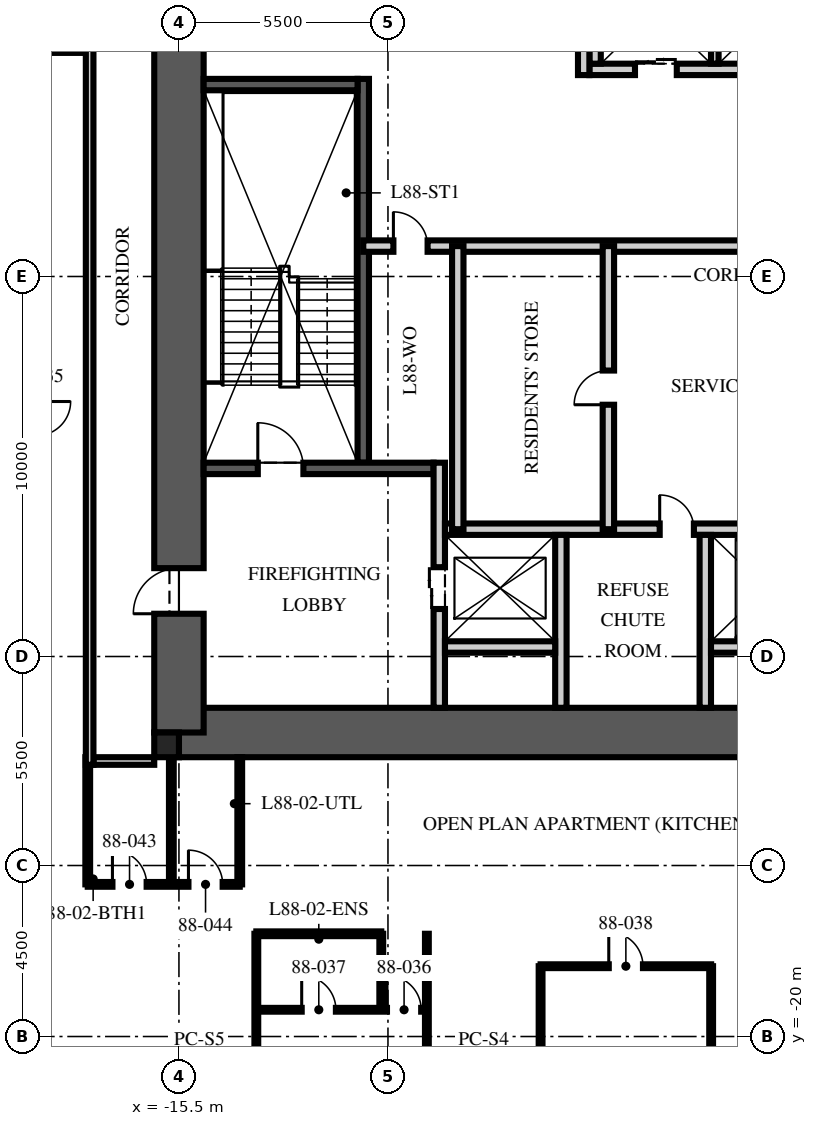
"""IFC4 building model, lengths in metres.
Left out: names, types, materials, properties, quantities, classifications, styles, units other than length and angle.
Written with IfcOpenShell. Run it as: python <this file> out.ifc"""

import sys

from ifc_helpers import new_model, si_unit, direction, frame, frame_2d, origin, origin_2d, place, context, subcontext, project, spatial, rectangle, extrude, element, fill, save


model = new_model("IFC4")
c1 = context("Model", 3, precision=1e-05, world=origin(), true_north=direction((0.0, 1.0)))
c2 = subcontext(c1, "Body", "Model", "MODEL_VIEW")
j1 = project(units=[si_unit("LENGTHUNIT", "METRE"), si_unit("PLANEANGLEUNIT", "RADIAN")], contexts=[c1])
p1 = place(None, origin())
s1 = spatial("IfcSite", under=j1, at=p1, CompositionType="ELEMENT")
p2 = place(p1, origin())
s2 = spatial("IfcBuilding", under=s1, at=p2, CompositionType="ELEMENT")
p3 = place(p2, frame((0.0, 0.0, 349.5)))
s3 = spatial("IfcBuildingStorey", under=s2, at=p3, CompositionType="ELEMENT", Elevation=349.5)
p4 = place(p3, frame((-15.5, -12.0, -0.25), z_axis=(0.0, 0.0, 1.0), x_axis=(1.0, 0.0, 0.0)))
e1 = element("IfcWall", 1, at=p4, inside=s3, PredefinedType="SHEAR", context=c2, shape_type="SweptSolid", body=[
    extrude(rectangle(XDim=31.0, YDim=1.3, at=frame_2d((15.5, 0.0))), origin(), (0.0, 0.0, 1.0), 3.7),
])
p5 = place(p3, frame((-15.5, -12.0, -0.25), z_axis=(0.0, 0.0, 1.0), x_axis=(0.0, 1.0, 0.0)))
e2 = element("IfcWall", 2, at=p5, inside=s3, PredefinedType="SHEAR", context=c2, shape_type="SweptSolid", body=[
    extrude(rectangle(XDim=24.0, YDim=1.3, at=frame_2d((12.0, 0.0))), origin(), (0.0, 0.0, 1.0), 3.7),
])
p6 = place(p5, frame((3.125, 0.0, 0.25)))
e3 = element("IfcOpeningElement", 3, at=p6, cuts=e2, PredefinedType="OPENING", context=c2, shape_type="SweptSolid", body=[
    extrude(rectangle(XDim=1.2, YDim=2.1, at=frame_2d((0.6, 1.05))), frame((0.0, 0.66, 0.0), z_axis=(0.0, -1.0, 0.0), x_axis=(1.0, 0.0, 0.0)), (0.0, 0.0, 1.0), 1.32),
])
p7 = place(p5, frame((19.375, 0.0, 0.25)))
e4 = element("IfcOpeningElement", 4, at=p7, cuts=e2, PredefinedType="OPENING", context=c2, shape_type="SweptSolid", body=[
    extrude(rectangle(XDim=1.8, YDim=2.1, at=frame_2d((0.9, 1.05))), frame((0.0, 0.66, 0.0), z_axis=(0.0, -1.0, 0.0), x_axis=(1.0, 0.0, 0.0)), (0.0, 0.0, 1.0), 1.32),
])
p8 = place(p3, frame((-15.825, -12.325, -0.25), z_axis=(0.0, 0.0, 1.0), x_axis=(1.0, 0.0, 0.0)))
e5 = element("IfcColumn", 5, at=p8, inside=s3, PredefinedType="COLUMN", context=c2, shape_type="SweptSolid", body=[
    extrude(rectangle(XDim=0.65, YDim=0.65, at=origin_2d()), origin(), (0.0, 0.0, 1.0), 3.7),
])
p9 = place(p3, frame((-10.65, -4.9, 0.0), z_axis=(0.0, 0.0, 1.0), x_axis=(0.0, 1.0, 0.0)))
e6 = element("IfcWall", 6, at=p9, inside=s3, PredefinedType="SOLIDWALL", context=c2, shape_type="SweptSolid", body=[
    extrude(rectangle(XDim=10.1, YDim=0.3, at=frame_2d((5.05, 0.0))), origin(), (0.0, 0.0, 1.0), 3.45),
])
p10 = place(p3, frame((-14.85, -5.05, 0.0), z_axis=(0.0, 0.0, 1.0), x_axis=(1.0, 0.0, 0.0)))
e7 = element("IfcWall", 7, at=p10, inside=s3, PredefinedType="SOLIDWALL", context=c2, shape_type="SweptSolid", body=[
    extrude(rectangle(XDim=6.05, YDim=0.3, at=frame_2d((3.025, 0.0))), origin(), (0.0, 0.0, 1.0), 3.45),
])
p11 = place(p10, frame((1.425, 0.0, 0.0)))
e8 = element("IfcOpeningElement", 8, at=p11, cuts=e7, PredefinedType="OPENING", context=c2, shape_type="SweptSolid", body=[
    extrude(rectangle(XDim=1.2, YDim=2.1, at=frame_2d((0.6, 1.05))), frame((0.0, 0.16, 0.0), z_axis=(0.0, -1.0, 0.0), x_axis=(1.0, 0.0, 0.0)), (0.0, 0.0, 1.0), 0.32),
])
p12 = place(p3, frame((-14.85, 5.05, 0.0), z_axis=(0.0, 0.0, 1.0), x_axis=(1.0, 0.0, 0.0)))
e9 = element("IfcWall", 9, at=p12, inside=s3, PredefinedType="SOLIDWALL", context=c2, shape_type="SweptSolid", body=[
    extrude(rectangle(XDim=4.05, YDim=0.3, at=frame_2d((2.025, 0.0))), origin(), (0.0, 0.0, 1.0), 3.45),
])
p13 = place(p3, frame((-8.65, -11.35, 0.0), z_axis=(0.0, 0.0, 1.0), x_axis=(0.0, 1.0, 0.0)))
e10 = element("IfcWall", 10, at=p13, inside=s3, PredefinedType="PARTITIONING", context=c2, shape_type="SweptSolid", body=[
    extrude(rectangle(XDim=6.45, YDim=0.3, at=frame_2d((3.225, 0.0))), origin(), (0.0, 0.0, 1.0), 3.45),
])
p14 = place(p13, frame((2.6, 0.0, 0.0)))
e11 = element("IfcOpeningElement", 11, at=p14, cuts=e10, PredefinedType="OPENING", context=c2, shape_type="SweptSolid", body=[
    extrude(rectangle(XDim=1.1, YDim=2.1, at=frame_2d((0.55, 1.05))), frame((0.0, 0.16, 0.0), z_axis=(0.0, -1.0, 0.0), x_axis=(1.0, 0.0, 0.0)), (0.0, 0.0, 1.0), 0.32),
])
p15 = place(p3, frame((-8.5, -6.65, 0.0), z_axis=(0.0, 0.0, 1.0), x_axis=(1.0, 0.0, 0.0)))
e12 = element("IfcWall", 12, at=p15, inside=s3, PredefinedType="PARTITIONING", context=c2, shape_type="SweptSolid", body=[
    extrude(rectangle(XDim=17.0, YDim=0.3, at=frame_2d((8.5, 0.0))), origin(), (0.0, 0.0, 1.0), 3.45),
])
p16 = place(p15, frame((7.8, 0.0, 0.0)))
e13 = element("IfcOpeningElement", 13, at=p16, cuts=e12, PredefinedType="OPENING", context=c2, shape_type="SweptSolid", body=[
    extrude(rectangle(XDim=1.3, YDim=2.4, at=frame_2d((0.65, 1.2))), frame((0.0, 0.16, 0.0), z_axis=(0.0, -1.0, 0.0), x_axis=(1.0, 0.0, 0.0)), (0.0, 0.0, 1.0), 0.32),
])
p17 = place(p15, frame((5.65, 0.0, 0.0)))
e14 = element("IfcOpeningElement", 14, at=p17, cuts=e12, PredefinedType="OPENING", context=c2, shape_type="SweptSolid", body=[
    extrude(rectangle(XDim=0.9, YDim=2.1, at=frame_2d((0.45, 1.05))), frame((0.0, 0.16, 0.0), z_axis=(0.0, -1.0, 0.0), x_axis=(1.0, 0.0, 0.0)), (0.0, 0.0, 1.0), 0.32),
])
p18 = place(p15, frame((10.4, 0.0, 0.0)))
e15 = element("IfcOpeningElement", 15, at=p18, cuts=e12, PredefinedType="OPENING", context=c2, shape_type="SweptSolid", body=[
    extrude(rectangle(XDim=0.9, YDim=2.1, at=frame_2d((0.45, 1.05))), frame((0.0, 0.16, 0.0), z_axis=(0.0, -1.0, 0.0), x_axis=(1.0, 0.0, 0.0)), (0.0, 0.0, 1.0), 0.32),
])
for number, where, z_axis, x_axis in (
    (16, (-5.45, -11.35, 0.0), (0.0, 0.0, 1.0), (0.0, 1.0, 0.0)),
    (17, (-1.65, -11.35, 0.0), (0.0, 0.0, 1.0), (0.0, 1.0, 0.0)),
):
    element("IfcWall", number, at=place(p3, frame(where, z_axis=z_axis, x_axis=x_axis)), inside=s3, PredefinedType="PARTITIONING", context=c2, shape_type="SweptSolid", body=[
        extrude(rectangle(XDim=4.55, YDim=0.3, at=frame_2d((2.275, 0.0))), origin(), (0.0, 0.0, 1.0), 3.45),
    ])
for number, where, z_axis, x_axis in (
    (18, (-8.5, -9.75, 0.0), (0.0, 0.0, 1.0), (1.0, 0.0, 0.0)),
    (19, (-1.5, -9.75, 0.0), (0.0, 0.0, 1.0), (1.0, 0.0, 0.0)),
):
    element("IfcWall", number, at=place(p3, frame(where, z_axis=z_axis, x_axis=x_axis)), inside=s3, PredefinedType="PARTITIONING", context=c2, shape_type="SweptSolid", body=[
        extrude(rectangle(XDim=2.9, YDim=0.3, at=frame_2d((1.45, 0.0))), origin(), (0.0, 0.0, 1.0), 3.45),
    ])
p19 = place(p3, frame((-4.7, 5.45, 0.0), z_axis=(0.0, 0.0, 1.0), x_axis=(1.0, 0.0, 0.0)))
e20 = element("IfcWall", 20, at=p19, inside=s3, PredefinedType="PARTITIONING", context=c2, shape_type="SweptSolid", body=[
    extrude(rectangle(XDim=9.7, YDim=0.3, at=frame_2d((4.85, 0.0))), origin(), (0.0, 0.0, 1.0), 3.45),
])
p20 = place(p19, frame((1.2, 0.0, 0.0)))
e21 = element("IfcOpeningElement", 21, at=p20, cuts=e20, PredefinedType="OPENING", context=c2, shape_type="SweptSolid", body=[
    extrude(rectangle(XDim=1.1, YDim=2.1, at=frame_2d((0.55, 1.05))), frame((0.0, 0.16, 0.0), z_axis=(0.0, -1.0, 0.0), x_axis=(1.0, 0.0, 0.0)), (0.0, 0.0, 1.0), 0.32),
])
p21 = place(p19, frame((4.3, 0.0, 0.0)))
e22 = element("IfcOpeningElement", 22, at=p21, cuts=e20, PredefinedType="OPENING", context=c2, shape_type="SweptSolid", body=[
    extrude(rectangle(XDim=1.1, YDim=2.1, at=frame_2d((0.55, 1.05))), frame((0.0, 0.16, 0.0), z_axis=(0.0, -1.0, 0.0), x_axis=(1.0, 0.0, 0.0)), (0.0, 0.0, 1.0), 0.32),
])
p22 = place(p19, frame((7.4, 0.0, 0.0)))
e23 = element("IfcOpeningElement", 23, at=p22, cuts=e20, PredefinedType="OPENING", context=c2, shape_type="SweptSolid", body=[
    extrude(rectangle(XDim=1.1, YDim=2.1, at=frame_2d((0.55, 1.05))), frame((0.0, 0.16, 0.0), z_axis=(0.0, -1.0, 0.0), x_axis=(1.0, 0.0, 0.0)), (0.0, 0.0, 1.0), 0.32),
])
p23 = place(p3, frame((-4.55, 5.6, 0.0), z_axis=(0.0, 0.0, 1.0), x_axis=(0.0, 1.0, 0.0)))
e24 = element("IfcWall", 24, at=p23, inside=s3, PredefinedType="PARTITIONING", context=c2, shape_type="SweptSolid", body=[
    extrude(rectangle(XDim=2.8, YDim=0.3, at=frame_2d((1.4, 0.0))), origin(), (0.0, 0.0, 1.0), 3.45),
])
p24 = place(p3, frame((-1.4, 5.6, 0.0), z_axis=(0.0, 0.0, 1.0), x_axis=(0.0, 1.0, 0.0)))
e25 = element("IfcWall", 25, at=p24, inside=s3, PredefinedType="PARTITIONING", context=c2, shape_type="SweptSolid", body=[
    extrude(rectangle(XDim=2.8, YDim=0.2, at=frame_2d((1.4, 0.0))), origin(), (0.0, 0.0, 1.0), 3.45),
])
p25 = place(p3, frame((-10.65, 0.8, 0.0), z_axis=(0.0, 0.0, 1.0), x_axis=(1.0, 0.0, 0.0)))
e26 = element("IfcWall", 26, at=p25, inside=s3, PredefinedType="PARTITIONING", context=c2, shape_type="SweptSolid", body=[
    extrude(rectangle(XDim=21.3, YDim=0.3, at=frame_2d((10.65, 0.0))), origin(), (0.0, 0.0, 1.0), 3.45),
])
p26 = place(p25, frame((10.05, 0.0, 0.0)))
e27 = element("IfcOpeningElement", 27, at=p26, cuts=e26, PredefinedType="OPENING", context=c2, shape_type="SweptSolid", body=[
    extrude(rectangle(XDim=1.2, YDim=2.1, at=frame_2d((0.6, 1.05))), frame((0.0, 0.16, 0.0), z_axis=(0.0, -1.0, 0.0), x_axis=(1.0, 0.0, 0.0)), (0.0, 0.0, 1.0), 0.32),
])
p27 = place(p25, frame((0.793, 0.0, 0.0)))
e28 = element("IfcOpeningElement", 28, at=p27, cuts=e26, PredefinedType="OPENING", context=c2, shape_type="SweptSolid", body=[
    extrude(rectangle(XDim=0.9, YDim=2.1, at=frame_2d((0.45, 1.05))), frame((0.0, 0.16, 0.0), z_axis=(0.0, -1.0, 0.0), x_axis=(1.0, 0.0, 0.0)), (0.0, 0.0, 1.0), 0.32),
])
p28 = place(p3, frame((-4.2, -6.65, 0.0), z_axis=(0.0, 0.0, 1.0), x_axis=(0.0, 1.0, 0.0)))
e29 = element("IfcWall", 29, at=p28, inside=s3, PredefinedType="PARTITIONING", context=c2, shape_type="SweptSolid", body=[
    extrude(rectangle(XDim=7.45, YDim=0.3, at=frame_2d((3.725, 0.0))), origin(), (0.0, 0.0, 1.0), 3.45),
])
p29 = place(p28, frame((3.275, 0.0, 0.0)))
e30 = element("IfcOpeningElement", 30, at=p29, cuts=e29, PredefinedType="OPENING", context=c2, shape_type="SweptSolid", body=[
    extrude(rectangle(XDim=0.9, YDim=2.1, at=frame_2d((0.45, 1.05))), frame((0.0, 0.16, 0.0), z_axis=(0.0, -1.0, 0.0), x_axis=(1.0, 0.0, 0.0)), (0.0, 0.0, 1.0), 0.32),
])
p30 = place(p3, frame((-8.163, -6.65, 0.0), z_axis=(0.0, 0.0, 1.0), x_axis=(0.0, 1.0, 0.0)))
e31 = element("IfcWall", 31, at=p30, inside=s3, PredefinedType="PARTITIONING", context=c2, shape_type="SweptSolid", body=[
    extrude(rectangle(XDim=7.45, YDim=0.3, at=frame_2d((3.725, 0.0))), origin(), (0.0, 0.0, 1.0), 3.45),
])
p31 = place(p3, frame((-4.85, 5.3, 0.0), z_axis=(0.0, 0.0, 1.0), x_axis=(0.0, 1.0, 0.0)))
e32 = element("IfcWall", 32, at=p31, inside=s3, PredefinedType="PARTITIONING", context=c2, shape_type="SweptSolid", body=[
    extrude(rectangle(XDim=6.05, YDim=0.3, at=frame_2d((3.025, 0.0))), origin(), (0.0, 0.0, 1.0), 3.45),
])
p32 = place(p31, frame((4.225, 0.0, 0.0)))
e33 = element("IfcOpeningElement", 33, at=p32, cuts=e32, PredefinedType="OPENING", context=c2, shape_type="SweptSolid", body=[
    extrude(rectangle(XDim=0.9, YDim=2.1, at=frame_2d((0.45, 1.05))), frame((0.0, 0.16, 0.0), z_axis=(0.0, -1.0, 0.0), x_axis=(1.0, 0.0, 0.0)), (0.0, 0.0, 1.0), 0.32),
])
p33 = place(p3, frame((-16.15, -12.75, 0.0), z_axis=(0.0, 0.0, 1.0), x_axis=(-1.0, 0.0, 0.0)))
e34 = element("IfcWall", 34, at=p33, inside=s3, PredefinedType="PARTITIONING", context=c2, shape_type="SweptSolid", body=[
    extrude(rectangle(XDim=1.6, YDim=0.2, at=frame_2d((0.8, 0.0))), origin(), (0.0, 0.0, 1.0), 2.45),
])
p34 = place(p3, frame((-17.95, 5.984, 0.0), z_axis=(0.0, 0.0, 1.0), x_axis=(-1.0, 0.0, 0.0)))
e35 = element("IfcWall", 35, at=p34, inside=s3, PredefinedType="PARTITIONING", context=c2, shape_type="SweptSolid", body=[
    extrude(rectangle(XDim=4.8, YDim=0.2, at=frame_2d((2.4, 0.0))), origin(), (0.0, 0.0, 1.0), 2.85),
])
for number, where, z_axis, x_axis in (
    (36, (-13.464, -17.296, 0.0), (0.0, 0.0, 1.0), (0.0, -1.0, 0.0)),
    (37, (-8.976, -17.296, 0.0), (0.0, 0.0, 1.0), (0.0, -1.0, 0.0)),
):
    element("IfcWall", number, at=place(p3, frame(where, z_axis=z_axis, x_axis=x_axis)), inside=s3, PredefinedType="PARTITIONING", context=c2, shape_type="SweptSolid", body=[
        extrude(rectangle(XDim=5.454, YDim=0.1, at=frame_2d((2.727, 0.0))), origin(), (0.0, 0.0, 1.0), 2.85),
    ])
for number, where, z_axis, x_axis in (
    (38, (-5.984, -18.15, 0.0), (0.0, 0.0, 1.0), (0.0, -1.0, 0.0)),
    (39, (-1.496, -18.15, 0.0), (0.0, 0.0, 1.0), (0.0, -1.0, 0.0)),
):
    element("IfcWall", number, at=place(p3, frame(where, z_axis=z_axis, x_axis=x_axis)), inside=s3, PredefinedType="PARTITIONING", context=c2, shape_type="SweptSolid", body=[
        extrude(rectangle(XDim=4.6, YDim=0.1, at=frame_2d((2.3, 0.0))), origin(), (0.0, 0.0, 1.0), 2.85),
    ])
p35 = place(p3, frame((-13.464, -19.296, 0.0), z_axis=(0.0, 0.0, 1.0), x_axis=(1.0, 0.0, 0.0)))
e40 = element("IfcWall", 40, at=p35, inside=s3, PredefinedType="PARTITIONING", context=c2, shape_type="SweptSolid", body=[
    extrude(rectangle(XDim=4.488, YDim=0.1, at=frame_2d((2.244, 0.0))), origin(), (0.0, 0.0, 1.0), 2.56),
])
p36 = place(p35, frame((3.438, 0.0, 0.0)))
e41 = element("IfcOpeningElement", 41, at=p36, cuts=e40, PredefinedType="OPENING", context=c2, shape_type="SweptSolid", body=[
    extrude(rectangle(XDim=0.9, YDim=2.1, at=frame_2d((0.45, 1.05))), frame((0.0, 0.06, 0.0), z_axis=(0.0, -1.0, 0.0), x_axis=(1.0, 0.0, 0.0)), (0.0, 0.0, 1.0), 0.12),
])
p37 = place(p35, frame((1.194, 0.0, 0.0)))
e42 = element("IfcOpeningElement", 42, at=p37, cuts=e40, PredefinedType="OPENING", context=c2, shape_type="SweptSolid", body=[
    extrude(rectangle(XDim=0.9, YDim=2.1, at=frame_2d((0.45, 1.05))), frame((0.0, 0.06, 0.0), z_axis=(0.0, -1.0, 0.0), x_axis=(1.0, 0.0, 0.0)), (0.0, 0.0, 1.0), 0.12),
])
p38 = place(p3, frame((-10.176, -17.296, 0.0), z_axis=(0.0, 0.0, 1.0), x_axis=(0.0, -1.0, 0.0)))
e43 = element("IfcWall", 43, at=p38, inside=s3, PredefinedType="PARTITIONING", context=c2, shape_type="SweptSolid", body=[
    extrude(rectangle(XDim=2.0, YDim=0.1, at=frame_2d((1.0, 0.0))), origin(), (0.0, 0.0, 1.0), 3.45),
])
p39 = place(p3, frame((-13.464, -17.296, 0.0), z_axis=(0.0, 0.0, 1.0), x_axis=(1.0, 0.0, 0.0)))
e44 = element("IfcWall", 44, at=p39, inside=s3, PredefinedType="PARTITIONING", context=c2, shape_type="SweptSolid", body=[
    extrude(rectangle(XDim=3.288, YDim=0.125, at=frame_2d((1.644, 0.0))), origin(), (0.0, 0.0, 1.0), 2.56),
])
p40 = place(p3, frame((-5.984, -18.15, 0.0), z_axis=(0.0, 0.0, 1.0), x_axis=(1.0, 0.0, 0.0)))
e45 = element("IfcWall", 45, at=p40, inside=s3, PredefinedType="PARTITIONING", context=c2, shape_type="SweptSolid", body=[
    extrude(rectangle(XDim=4.488, YDim=0.1, at=frame_2d((2.244, 0.0))), origin(), (0.0, 0.0, 1.0), 2.56),
])
p41 = place(p40, frame((1.794, 0.0, 0.0)))
e46 = element("IfcOpeningElement", 46, at=p41, cuts=e45, PredefinedType="OPENING", context=c2, shape_type="SweptSolid", body=[
    extrude(rectangle(XDim=0.9, YDim=2.1, at=frame_2d((0.45, 1.05))), frame((0.0, 0.06, 0.0), z_axis=(0.0, -1.0, 0.0), x_axis=(1.0, 0.0, 0.0)), (0.0, 0.0, 1.0), 0.12),
])
p42 = place(p3, frame((-17.9, -15.996, 0.0), z_axis=(0.0, 0.0, 1.0), x_axis=(1.0, 0.0, 0.0)))
e47 = element("IfcWall", 47, at=p42, inside=s3, PredefinedType="PARTITIONING", context=c2, shape_type="SweptSolid", body=[
    extrude(rectangle(XDim=4.0, YDim=0.125, at=frame_2d((2.0, 0.0))), origin(), (0.0, 0.0, 1.0), 2.45),
])
p43 = place(p42, frame((0.65, 0.0, 0.0)))
e48 = element("IfcOpeningElement", 48, at=p43, cuts=e47, PredefinedType="OPENING", context=c2, shape_type="SweptSolid", body=[
    extrude(rectangle(XDim=0.9, YDim=2.1, at=frame_2d((0.45, 1.05))), frame((0.0, 0.073, 0.0), z_axis=(0.0, -1.0, 0.0), x_axis=(1.0, 0.0, 0.0)), (0.0, 0.0, 1.0), 0.145),
])
p44 = place(p42, frame((2.65, 0.0, 0.0)))
e49 = element("IfcOpeningElement", 49, at=p44, cuts=e47, PredefinedType="OPENING", context=c2, shape_type="SweptSolid", body=[
    extrude(rectangle(XDim=0.9, YDim=2.1, at=frame_2d((0.45, 1.05))), frame((0.0, 0.073, 0.0), z_axis=(0.0, -1.0, 0.0), x_axis=(1.0, 0.0, 0.0)), (0.0, 0.0, 1.0), 0.145),
])
for number, where, z_axis, x_axis in (
    (50, (-17.9, -12.65, 0.0), (0.0, 0.0, 1.0), (0.0, -1.0, 0.0)),
    (51, (-15.7, -12.65, 0.0), (0.0, 0.0, 1.0), (0.0, -1.0, 0.0)),
):
    element("IfcWall", number, at=place(p3, frame(where, z_axis=z_axis, x_axis=x_axis)), inside=s3, PredefinedType="PARTITIONING", context=c2, shape_type="SweptSolid", body=[
        extrude(rectangle(XDim=3.346, YDim=0.125, at=frame_2d((1.673, 0.0))), origin(), (0.0, 0.0, 1.0), 2.45),
    ])
p45 = place(p3, frame((-13.9, -12.65, 0.0), z_axis=(0.0, 0.0, 1.0), x_axis=(0.0, -1.0, 0.0)))
e52 = element("IfcWall", 52, at=p45, inside=s3, PredefinedType="PARTITIONING", context=c2, shape_type="SweptSolid", body=[
    extrude(rectangle(XDim=3.346, YDim=0.125, at=frame_2d((1.673, 0.0))), origin(), (0.0, 0.0, 1.0), 3.45),
])
p46 = place(p3, frame((-17.85, 12.85, 0.0), z_axis=(0.0, 0.0, 1.0), x_axis=(0.0, -1.0, 0.0)))
e53 = element("IfcWall", 53, at=p46, inside=s3, PredefinedType="PARTITIONING", context=c2, shape_type="SweptSolid", body=[
    extrude(rectangle(XDim=25.7, YDim=0.2, at=frame_2d((12.85, 0.0))), origin(), (0.0, 0.0, 1.0), 2.45),
])
p47 = place(p11, origin())
e54 = element("IfcDoor", 54, at=p47, inside=s3, OperationType="SINGLE_SWING_LEFT", PredefinedType="DOOR", context=c2, shape_type="SweptSolid", body=[
    extrude(rectangle(XDim=1.2, YDim=2.1, at=frame_2d((0.6, 1.05))), frame((0.0, 0.025, 0.0), z_axis=(0.0, -1.0, 0.0), x_axis=(1.0, 0.0, 0.0)), (0.0, 0.0, 1.0), 0.05),
])
fill(e8, e54)
p48 = place(p6, origin())
e55 = element("IfcDoor", 55, at=p48, inside=s3, OperationType="SINGLE_SWING_LEFT", PredefinedType="DOOR", context=c2, shape_type="SweptSolid", body=[
    extrude(rectangle(XDim=1.2, YDim=2.1, at=frame_2d((0.6, 1.05))), frame((0.0, 0.025, 0.0), z_axis=(0.0, -1.0, 0.0), x_axis=(1.0, 0.0, 0.0)), (0.0, 0.0, 1.0), 0.05),
])
fill(e3, e55)
p49 = place(p14, origin())
e56 = element("IfcDoor", 56, at=p49, inside=s3, OperationType="DOUBLE_DOOR_SLIDING", PredefinedType="DOOR", context=c2, shape_type="SweptSolid", body=[
    extrude(rectangle(XDim=1.1, YDim=2.1, at=frame_2d((0.55, 1.05))), frame((0.0, 0.025, 0.0), z_axis=(0.0, -1.0, 0.0), x_axis=(1.0, 0.0, 0.0)), (0.0, 0.0, 1.0), 0.05),
])
fill(e11, e56)
p50 = place(p20, origin())
e57 = element("IfcDoor", 57, at=p50, inside=s3, OperationType="DOUBLE_DOOR_SLIDING", PredefinedType="DOOR", context=c2, shape_type="SweptSolid", body=[
    extrude(rectangle(XDim=1.1, YDim=2.1, at=frame_2d((0.55, 1.05))), frame((0.0, 0.025, 0.0), z_axis=(0.0, -1.0, 0.0), x_axis=(1.0, 0.0, 0.0)), (0.0, 0.0, 1.0), 0.05),
])
fill(e21, e57)
p51 = place(p17, origin())
e58 = element("IfcDoor", 58, at=p51, inside=s3, OperationType="SINGLE_SWING_LEFT", PredefinedType="DOOR", context=c2, shape_type="SweptSolid", body=[
    extrude(rectangle(XDim=0.9, YDim=2.1, at=frame_2d((0.45, 1.05))), frame((0.0, 0.025, 0.0), z_axis=(0.0, -1.0, 0.0), x_axis=(1.0, 0.0, 0.0)), (0.0, 0.0, 1.0), 0.05),
])
fill(e14, e58)
p52 = place(p29, origin())
e59 = element("IfcDoor", 59, at=p52, inside=s3, OperationType="SINGLE_SWING_LEFT", PredefinedType="DOOR", context=c2, shape_type="SweptSolid", body=[
    extrude(rectangle(XDim=0.9, YDim=2.1, at=frame_2d((0.45, 1.05))), frame((0.0, 0.025, 0.0), z_axis=(0.0, -1.0, 0.0), x_axis=(1.0, 0.0, 0.0)), (0.0, 0.0, 1.0), 0.05),
])
fill(e30, e59)
p53 = place(p27, origin())
e60 = element("IfcDoor", 60, at=p53, inside=s3, OperationType="SINGLE_SWING_LEFT", PredefinedType="DOOR", context=c2, shape_type="SweptSolid", body=[
    extrude(rectangle(XDim=0.9, YDim=2.1, at=frame_2d((0.45, 1.05))), frame((0.0, 0.025, 0.0), z_axis=(0.0, -1.0, 0.0), x_axis=(1.0, 0.0, 0.0)), (0.0, 0.0, 1.0), 0.05),
])
fill(e28, e60)
p54 = place(p36, origin())
e61 = element("IfcDoor", 61, at=p54, inside=s3, OperationType="SINGLE_SWING_LEFT", PredefinedType="DOOR", context=c2, shape_type="SweptSolid", body=[
    extrude(rectangle(XDim=0.9, YDim=2.1, at=frame_2d((0.45, 1.05))), frame((0.0, 0.025, 0.0), z_axis=(0.0, -1.0, 0.0), x_axis=(1.0, 0.0, 0.0)), (0.0, 0.0, 1.0), 0.05),
])
fill(e41, e61)
p55 = place(p37, origin())
e62 = element("IfcDoor", 62, at=p55, inside=s3, OperationType="SINGLE_SWING_LEFT", PredefinedType="DOOR", context=c2, shape_type="SweptSolid", body=[
    extrude(rectangle(XDim=0.9, YDim=2.1, at=frame_2d((0.45, 1.05))), frame((0.0, 0.025, 0.0), z_axis=(0.0, -1.0, 0.0), x_axis=(1.0, 0.0, 0.0)), (0.0, 0.0, 1.0), 0.05),
])
fill(e42, e62)
p56 = place(p41, origin())
e63 = element("IfcDoor", 63, at=p56, inside=s3, OperationType="SINGLE_SWING_LEFT", PredefinedType="DOOR", context=c2, shape_type="SweptSolid", body=[
    extrude(rectangle(XDim=0.9, YDim=2.1, at=frame_2d((0.45, 1.05))), frame((0.0, 0.025, 0.0), z_axis=(0.0, -1.0, 0.0), x_axis=(1.0, 0.0, 0.0)), (0.0, 0.0, 1.0), 0.05),
])
fill(e46, e63)
p57 = place(p43, origin())
e64 = element("IfcDoor", 64, at=p57, inside=s3, OperationType="SINGLE_SWING_LEFT", PredefinedType="DOOR", context=c2, shape_type="SweptSolid", body=[
    extrude(rectangle(XDim=0.9, YDim=2.1, at=frame_2d((0.45, 1.05))), frame((0.0, 0.025, 0.0), z_axis=(0.0, -1.0, 0.0), x_axis=(1.0, 0.0, 0.0)), (0.0, 0.0, 1.0), 0.05),
])
fill(e48, e64)
p58 = place(p44, origin())
e65 = element("IfcDoor", 65, at=p58, inside=s3, OperationType="SINGLE_SWING_LEFT", PredefinedType="DOOR", context=c2, shape_type="SweptSolid", body=[
    extrude(rectangle(XDim=0.9, YDim=2.1, at=frame_2d((0.45, 1.05))), frame((0.0, 0.025, 0.0), z_axis=(0.0, -1.0, 0.0), x_axis=(1.0, 0.0, 0.0)), (0.0, 0.0, 1.0), 0.05),
])
fill(e49, e65)
save(model, sys.argv[1])
